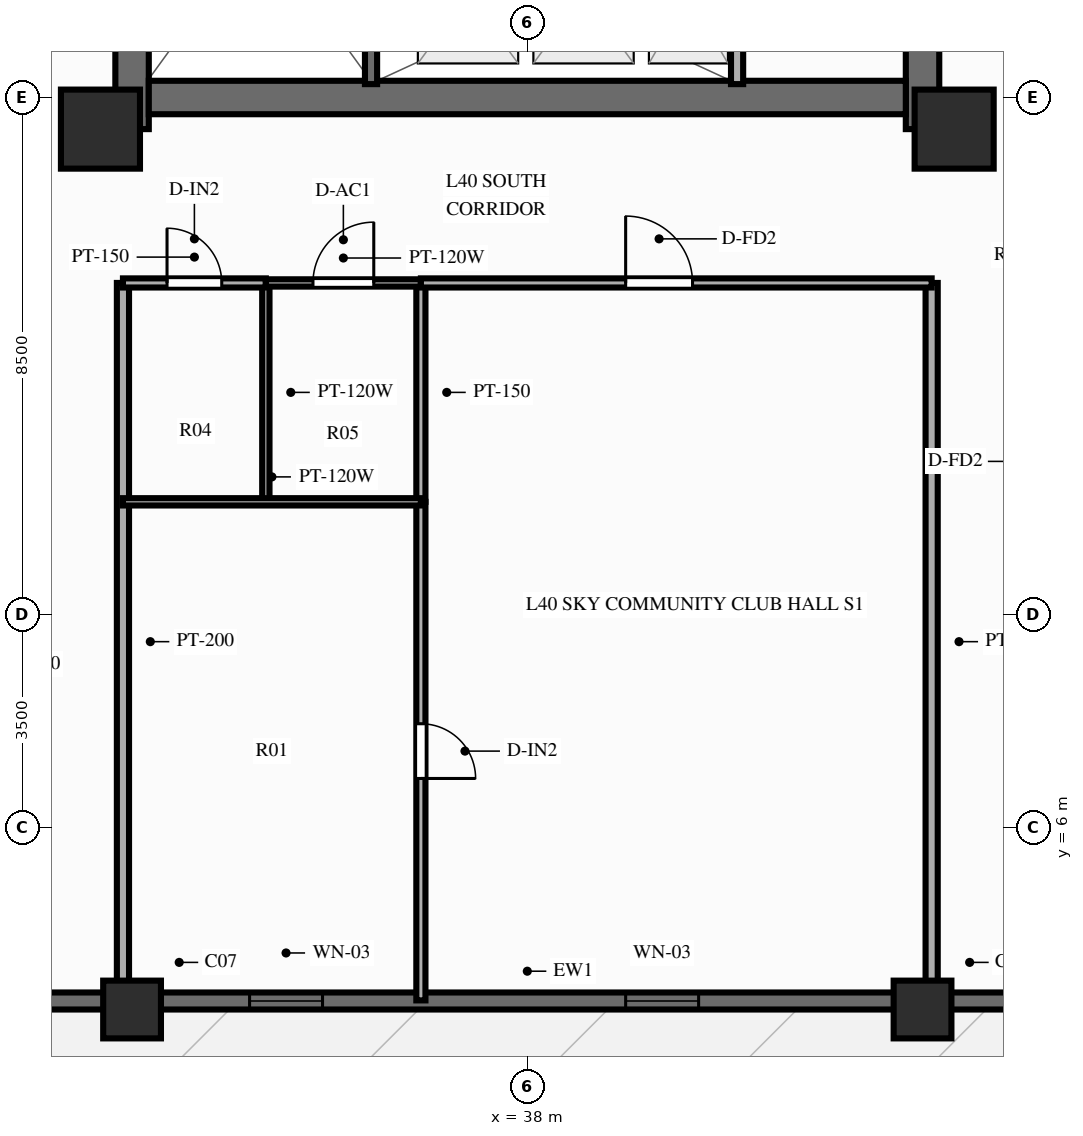
"""IFC4 building model, lengths in metres.
Left out: names, types, materials, properties, quantities, classifications, styles, units other than length and angle.
Written with IfcOpenShell. Run it as: python <this file> out.ifc"""

import sys

from ifc_helpers import new_model, si_unit, direction, frame, frame_2d, origin, origin_2d, place, context, subcontext, project, spatial, rectangle, extrude, source, transform, mapped, element, fill, save


model = new_model("IFC4")
c1 = context("Model", 3, precision=1e-05, world=origin(), true_north=direction((0.0, 1.0)))
c2 = subcontext(c1, "Body", "Model", "MODEL_VIEW")
j1 = project(units=[si_unit("LENGTHUNIT", "METRE"), si_unit("PLANEANGLEUNIT", "RADIAN")], contexts=[c1])
p1 = place(None, origin())
s1 = spatial("IfcSite", under=j1, at=p1, CompositionType="ELEMENT")
p2 = place(p1, origin())
s2 = spatial("IfcBuilding", under=s1, at=p2, CompositionType="ELEMENT")
p3 = place(p2, frame((0.0, 0.0, 126.75)))
s3 = spatial("IfcBuildingStorey", under=s2, at=p3, CompositionType="ELEMENT", Elevation=126.75)
p4 = place(p3, frame((31.5, 17.48, 0.0), z_axis=(0.0, 0.0, 1.0), x_axis=(0.0, 1.0, 0.0)))
e1 = element("IfcWall", 1, at=p4, inside=s3, PredefinedType="SHEAR", context=c2, shape_type="SweptSolid", body=[
    extrude(rectangle(XDim=19.04, YDim=0.55, at=frame_2d((9.52, 0.0))), origin(), (0.0, 0.0, 1.0), 3.0),
])
p5 = place(p4, frame((6.32, 0.0, 0.0)))
e2 = element("IfcOpeningElement", 2, at=p5, cuts=e1, PredefinedType="OPENING", context=c2, shape_type="SweptSolid", body=[
    extrude(rectangle(XDim=1.1, YDim=2.15, at=frame_2d((0.55, 1.075))), frame((0.0, 0.287, 0.0), z_axis=(0.0, -1.0, 0.0), x_axis=(1.0, 0.0, 0.0)), (0.0, 0.0, 1.0), 0.574),
])
p6 = place(p3, frame((44.5, 17.48, 0.0), z_axis=(0.0, 0.0, 1.0), x_axis=(0.0, 1.0, 0.0)))
e3 = element("IfcWall", 3, at=p6, inside=s3, PredefinedType="SHEAR", context=c2, shape_type="SweptSolid", body=[
    extrude(rectangle(XDim=19.04, YDim=0.55, at=frame_2d((9.52, 0.0))), origin(), (0.0, 0.0, 1.0), 3.0),
])
p7 = place(p6, frame((12.67, 0.0, 0.0), z_axis=(0.0, 0.0, 1.0), x_axis=(-1.0, 0.0, 0.0)))
e4 = element("IfcOpeningElement", 4, at=p7, cuts=e3, PredefinedType="OPENING", context=c2, shape_type="SweptSolid", body=[
    extrude(rectangle(XDim=1.1, YDim=2.15, at=frame_2d((0.55, 1.075))), frame((0.0, 0.287, 0.0), z_axis=(0.0, -1.0, 0.0), x_axis=(1.0, 0.0, 0.0)), (0.0, 0.0, 1.0), 0.574),
])
p8 = place(p3, frame((31.775, 18.0, 0.0), z_axis=(0.0, 0.0, 1.0), x_axis=(1.0, 0.0, 0.0)))
e5 = element("IfcWall", 5, at=p8, inside=s3, PredefinedType="SHEAR", context=c2, shape_type="SweptSolid", body=[
    extrude(rectangle(XDim=12.45, YDim=0.55, at=frame_2d((6.225, 0.0))), origin(), (0.0, 0.0, 1.0), 3.0),
])
m1 = source(origin(), c2, "Body", "SweptSolid", [
    extrude(rectangle(XDim=1.3, YDim=1.3, at=origin_2d()), origin(), (0.0, 0.0, 1.0), 3.0),
])
for number, where, z_axis, x_axis in (
    (6, (30.98, 17.48, 0.0), (0.0, 0.0, 1.0), (1.0, 0.0, 0.0)),
    (7, (45.02, 17.48, 0.0), (0.0, 0.0, 1.0), (1.0, 0.0, 0.0)),
):
    element("IfcColumn", number, at=place(p3, frame(where, z_axis=z_axis, x_axis=x_axis)), inside=s3, PredefinedType="COLUMN", context=c2, shape_type="MappedRepresentation", body=[
        mapped(m1, transform((0.0, 0.0, 0.0), scale=1.0)),
    ])
m2 = source(origin(), c2, "Body", "SweptSolid", [
    extrude(rectangle(XDim=0.95, YDim=0.95, at=origin_2d()), origin(), (0.0, 0.0, 1.0), 3.0),
])
for number, where, z_axis, x_axis in (
    (8, (31.5, 3.0, 0.0), (0.0, 0.0, 1.0), (1.0, 0.0, 0.0)),
    (9, (44.5, 3.0, 0.0), (0.0, 0.0, 1.0), (1.0, 0.0, 0.0)),
):
    element("IfcColumn", number, at=place(p3, frame(where, z_axis=z_axis, x_axis=x_axis)), inside=s3, PredefinedType="COLUMN", context=c2, shape_type="MappedRepresentation", body=[
        mapped(m2, transform((0.0, 0.0, 0.0), scale=1.0)),
    ])
p9 = place(p3, frame((16.2, 3.14, 0.0), z_axis=(0.0, 0.0, 1.0), x_axis=(1.0, 0.0, 0.0)))
e10 = element("IfcWall", 10, at=p9, inside=s3, PredefinedType="SOLIDWALL", context=c2, shape_type="SweptSolid", body=[
    extrude(rectangle(XDim=43.6, YDim=0.28, at=frame_2d((21.8, 0.0))), origin(), (0.0, 0.0, 1.0), 2.28),
])
p10 = place(p9, frame((8.2, 0.0, 0.0), z_axis=(0.0, 0.0, 1.0), x_axis=(-1.0, 0.0, 0.0)))
e11 = element("IfcOpeningElement", 11, at=p10, cuts=e10, PredefinedType="OPENING", context=c2, shape_type="SweptSolid", body=[
    extrude(rectangle(XDim=1.1, YDim=2.15, at=frame_2d((0.55, 1.075))), frame((0.0, 0.152, 0.0), z_axis=(0.0, -1.0, 0.0), x_axis=(1.0, 0.0, 0.0)), (0.0, 0.0, 1.0), 0.304),
])
p11 = place(p9, frame((17.232, 0.0, 0.25)))
e12 = element("IfcOpeningElement", 12, at=p11, cuts=e10, PredefinedType="OPENING", context=c2, shape_type="SweptSolid", body=[
    extrude(rectangle(XDim=1.2, YDim=1.5, at=frame_2d((0.6, 0.75))), frame((0.0, 0.152, 0.0), z_axis=(0.0, -1.0, 0.0), x_axis=(1.0, 0.0, 0.0)), (0.0, 0.0, 1.0), 0.304),
])
p12 = place(p9, frame((23.417, 0.0, 0.25)))
e13 = element("IfcOpeningElement", 13, at=p12, cuts=e10, PredefinedType="OPENING", context=c2, shape_type="SweptSolid", body=[
    extrude(rectangle(XDim=1.2, YDim=1.5, at=frame_2d((0.6, 0.75))), frame((0.0, 0.152, 0.0), z_axis=(0.0, -1.0, 0.0), x_axis=(1.0, 0.0, 0.0)), (0.0, 0.0, 1.0), 0.304),
])
p13 = place(p9, frame((35.35, 0.0, 0.25)))
e14 = element("IfcOpeningElement", 14, at=p13, cuts=e10, PredefinedType="OPENING", context=c2, shape_type="SweptSolid", body=[
    extrude(rectangle(XDim=1.2, YDim=1.5, at=frame_2d((0.6, 0.75))), frame((0.0, 0.152, 0.0), z_axis=(0.0, -1.0, 0.0), x_axis=(1.0, 0.0, 0.0)), (0.0, 0.0, 1.0), 0.304),
])
p14 = place(p3, frame((41.45, 18.22, 0.0), z_axis=(0.0, 0.0, 1.0), x_axis=(0.0, 1.0, 0.0)))
e15 = element("IfcWall", 15, at=p14, inside=s3, PredefinedType="PARTITIONING", context=c2, shape_type="SweptSolid", body=[
    extrude(rectangle(XDim=2.86, YDim=0.2, at=frame_2d((1.43, 0.0))), origin(), (0.0, 0.0, 1.0), 2.79),
])
p15 = place(p3, frame((35.43, 18.22, 0.0), z_axis=(0.0, 0.0, 1.0), x_axis=(0.0, 1.0, 0.0)))
e16 = element("IfcWall", 16, at=p15, inside=s3, PredefinedType="SOLIDWALL", context=c2, shape_type="SweptSolid", body=[
    extrude(rectangle(XDim=7.22, YDim=0.2, at=frame_2d((3.61, 0.0))), origin(), (0.0, 0.0, 1.0), 2.79),
])
p16 = place(p15, frame((6.68, 0.0, 0.0), z_axis=(0.0, 0.0, 1.0), x_axis=(-1.0, 0.0, 0.0)))
e17 = element("IfcOpeningElement", 17, at=p16, cuts=e16, PredefinedType="OPENING", context=c2, shape_type="SweptSolid", body=[
    extrude(rectangle(XDim=1.1, YDim=2.15, at=frame_2d((0.55, 1.075))), frame((0.0, 0.112, 0.0), z_axis=(0.0, -1.0, 0.0), x_axis=(1.0, 0.0, 0.0)), (0.0, 0.0, 1.0), 0.224),
])
for number, where, z_axis, x_axis in (
    (18, (31.35, 14.95, 0.0), (0.0, 0.0, 1.0), (0.0, -1.0, 0.0)),
    (19, (44.65, 14.95, 0.0), (0.0, 0.0, 1.0), (0.0, -1.0, 0.0)),
):
    element("IfcWall", number, at=place(p3, frame(where, z_axis=z_axis, x_axis=x_axis)), inside=s3, PredefinedType="PARTITIONING", context=c2, shape_type="SweptSolid", body=[
        extrude(rectangle(XDim=11.8, YDim=0.2, at=frame_2d((5.9, 0.0))), origin(), (0.0, 0.0, 1.0), 2.34),
    ])
p17 = place(p3, frame((33.7, 14.95, 0.0), z_axis=(0.0, 0.0, 1.0), x_axis=(0.0, -1.0, 0.0)))
e20 = element("IfcWall", 20, at=p17, inside=s3, PredefinedType="PARTITIONING", context=c2, shape_type="SweptSolid", body=[
    extrude(rectangle(XDim=3.6, YDim=0.12, at=frame_2d((1.8, 0.0))), origin(), (0.0, 0.0, 1.0), 2.79),
])
p18 = place(p3, frame((36.25, 14.95, 0.0), z_axis=(0.0, 0.0, 1.0), x_axis=(0.0, -1.0, 0.0)))
e21 = element("IfcWall", 21, at=p18, inside=s3, PredefinedType="PARTITIONING", context=c2, shape_type="SweptSolid", body=[
    extrude(rectangle(XDim=3.6, YDim=0.15, at=frame_2d((1.8, 0.0))), origin(), (0.0, 0.0, 1.0), 2.79),
])
p19 = place(p3, frame((36.25, 11.35, 0.0), z_axis=(0.0, 0.0, 1.0), x_axis=(0.0, -1.0, 0.0)))
e22 = element("IfcWall", 22, at=p19, inside=s3, PredefinedType="PARTITIONING", context=c2, shape_type="SweptSolid", body=[
    extrude(rectangle(XDim=8.2, YDim=0.15, at=frame_2d((4.1, 0.0))), origin(), (0.0, 0.0, 1.0), 2.79),
])
p20 = place(p19, frame((3.65, 0.0, 0.0)))
e23 = element("IfcOpeningElement", 23, at=p20, cuts=e22, PredefinedType="OPENING", context=c2, shape_type="SweptSolid", body=[
    extrude(rectangle(XDim=0.9, YDim=2.1, at=frame_2d((0.45, 1.05))), frame((0.0, 0.087, 0.0), z_axis=(0.0, -1.0, 0.0), x_axis=(1.0, 0.0, 0.0)), (0.0, 0.0, 1.0), 0.174),
])
p21 = place(p3, frame((31.35, 11.35, 0.0), z_axis=(0.0, 0.0, 1.0), x_axis=(1.0, 0.0, 0.0)))
e24 = element("IfcWall", 24, at=p21, inside=s3, PredefinedType="PARTITIONING", context=c2, shape_type="SweptSolid", body=[
    extrude(rectangle(XDim=4.9, YDim=0.12, at=frame_2d((2.45, 0.0))), origin(), (0.0, 0.0, 1.0), 2.79),
])
p22 = place(p3, frame((31.35, 14.95, 0.0), z_axis=(0.0, 0.0, 1.0), x_axis=(1.0, 0.0, 0.0)))
e25 = element("IfcWall", 25, at=p22, inside=s3, PredefinedType="PARTITIONING", context=c2, shape_type="SweptSolid", body=[
    extrude(rectangle(XDim=2.35, YDim=0.15, at=frame_2d((1.175, 0.0))), origin(), (0.0, 0.0, 1.0), 2.79),
])
p23 = place(p22, frame((0.725, 0.0, 0.0)))
e26 = element("IfcOpeningElement", 26, at=p23, cuts=e25, PredefinedType="OPENING", context=c2, shape_type="SweptSolid", body=[
    extrude(rectangle(XDim=0.9, YDim=2.1, at=frame_2d((0.45, 1.05))), frame((0.0, 0.087, 0.0), z_axis=(0.0, -1.0, 0.0), x_axis=(1.0, 0.0, 0.0)), (0.0, 0.0, 1.0), 0.174),
])
p24 = place(p3, frame((33.7, 14.95, 0.0), z_axis=(0.0, 0.0, 1.0), x_axis=(1.0, 0.0, 0.0)))
e27 = element("IfcWall", 27, at=p24, inside=s3, PredefinedType="PARTITIONING", context=c2, shape_type="SweptSolid", body=[
    extrude(rectangle(XDim=2.55, YDim=0.12, at=frame_2d((1.275, 0.0))), origin(), (0.0, 0.0, 1.0), 2.79),
])
p25 = place(p24, frame((0.775, 0.0, 0.0)))
e28 = element("IfcOpeningElement", 28, at=p25, cuts=e27, PredefinedType="OPENING", context=c2, shape_type="SweptSolid", body=[
    extrude(rectangle(XDim=1.0, YDim=2.1, at=frame_2d((0.5, 1.05))), frame((0.0, 0.072, 0.0), z_axis=(0.0, -1.0, 0.0), x_axis=(1.0, 0.0, 0.0)), (0.0, 0.0, 1.0), 0.144),
])
p26 = place(p3, frame((36.25, 14.95, 0.0), z_axis=(0.0, 0.0, 1.0), x_axis=(1.0, 0.0, 0.0)))
e29 = element("IfcWall", 29, at=p26, inside=s3, PredefinedType="PARTITIONING", context=c2, shape_type="SweptSolid", body=[
    extrude(rectangle(XDim=8.4, YDim=0.15, at=frame_2d((4.2, 0.0))), origin(), (0.0, 0.0, 1.0), 2.79),
])
p27 = place(p26, frame((3.367, 0.0, 0.0)))
e30 = element("IfcOpeningElement", 30, at=p27, cuts=e29, PredefinedType="OPENING", context=c2, shape_type="SweptSolid", body=[
    extrude(rectangle(XDim=1.1, YDim=2.15, at=frame_2d((0.55, 1.075))), frame((0.0, 0.087, 0.0), z_axis=(0.0, -1.0, 0.0), x_axis=(1.0, 0.0, 0.0)), (0.0, 0.0, 1.0), 0.174),
])
m3 = source(origin(), c2, "Body", "SweptSolid", [
    extrude(rectangle(XDim=1.2, YDim=1.5, at=frame_2d((0.6, 0.75))), frame((0.0, 0.03, 0.0), z_axis=(0.0, -1.0, 0.0), x_axis=(1.0, 0.0, 0.0)), (0.0, 0.0, 1.0), 0.06),
])
p28 = place(p11, origin())
e31 = element("IfcWindow", 31, at=p28, inside=s3, PartitioningType="SINGLE_PANEL", PredefinedType="WINDOW", context=c2, shape_type="MappedRepresentation", body=[
    mapped(m3, transform((0.0, 0.0, 0.0), scale=1.0)),
])
fill(e12, e31)
p29 = place(p12, origin())
e32 = element("IfcWindow", 32, at=p29, inside=s3, PartitioningType="SINGLE_PANEL", PredefinedType="WINDOW", context=c2, shape_type="MappedRepresentation", body=[
    mapped(m3, transform((0.0, 0.0, 0.0), scale=1.0)),
])
fill(e13, e32)
m4 = source(origin(), c2, "Body", "SweptSolid", [
    extrude(rectangle(XDim=0.9, YDim=2.1, at=frame_2d((0.45, 1.05))), frame((0.0, 0.025, 0.0), z_axis=(0.0, -1.0, 0.0), x_axis=(1.0, 0.0, 0.0)), (0.0, 0.0, 1.0), 0.05),
])
p30 = place(p20, origin())
e33 = element("IfcDoor", 33, at=p30, inside=s3, OperationType="SINGLE_SWING_RIGHT", PredefinedType="DOOR", context=c2, shape_type="MappedRepresentation", body=[
    mapped(m4, transform((0.0, 0.0, 0.0), scale=1.0)),
])
fill(e23, e33)
p31 = place(p23, origin())
e34 = element("IfcDoor", 34, at=p31, inside=s3, OperationType="SINGLE_SWING_LEFT", PredefinedType="DOOR", context=c2, shape_type="MappedRepresentation", body=[
    mapped(m4, transform((0.0, 0.0, 0.0), scale=1.0)),
])
fill(e26, e34)
m5 = source(origin(), c2, "Body", "SweptSolid", [
    extrude(rectangle(XDim=1.0, YDim=2.1, at=frame_2d((0.5, 1.05))), frame((0.0, 0.025, 0.0), z_axis=(0.0, -1.0, 0.0), x_axis=(1.0, 0.0, 0.0)), (0.0, 0.0, 1.0), 0.05),
])
p32 = place(p25, origin())
e35 = element("IfcDoor", 35, at=p32, inside=s3, OperationType="SINGLE_SWING_RIGHT", PredefinedType="DOOR", context=c2, shape_type="MappedRepresentation", body=[
    mapped(m5, transform((0.0, 0.0, 0.0), scale=1.0)),
])
fill(e28, e35)
m6 = source(origin(), c2, "Body", "SweptSolid", [
    extrude(rectangle(XDim=1.1, YDim=2.15, at=frame_2d((0.55, 1.075))), frame((0.0, 0.025, 0.0), z_axis=(0.0, -1.0, 0.0), x_axis=(1.0, 0.0, 0.0)), (0.0, 0.0, 1.0), 0.05),
])
p33 = place(p27, origin())
e36 = element("IfcDoor", 36, at=p33, inside=s3, OperationType="SINGLE_SWING_LEFT", PredefinedType="DOOR", context=c2, shape_type="MappedRepresentation", body=[
    mapped(m6, transform((0.0, 0.0, 0.0), scale=1.0)),
])
fill(e30, e36)
save(model, sys.argv[1])
